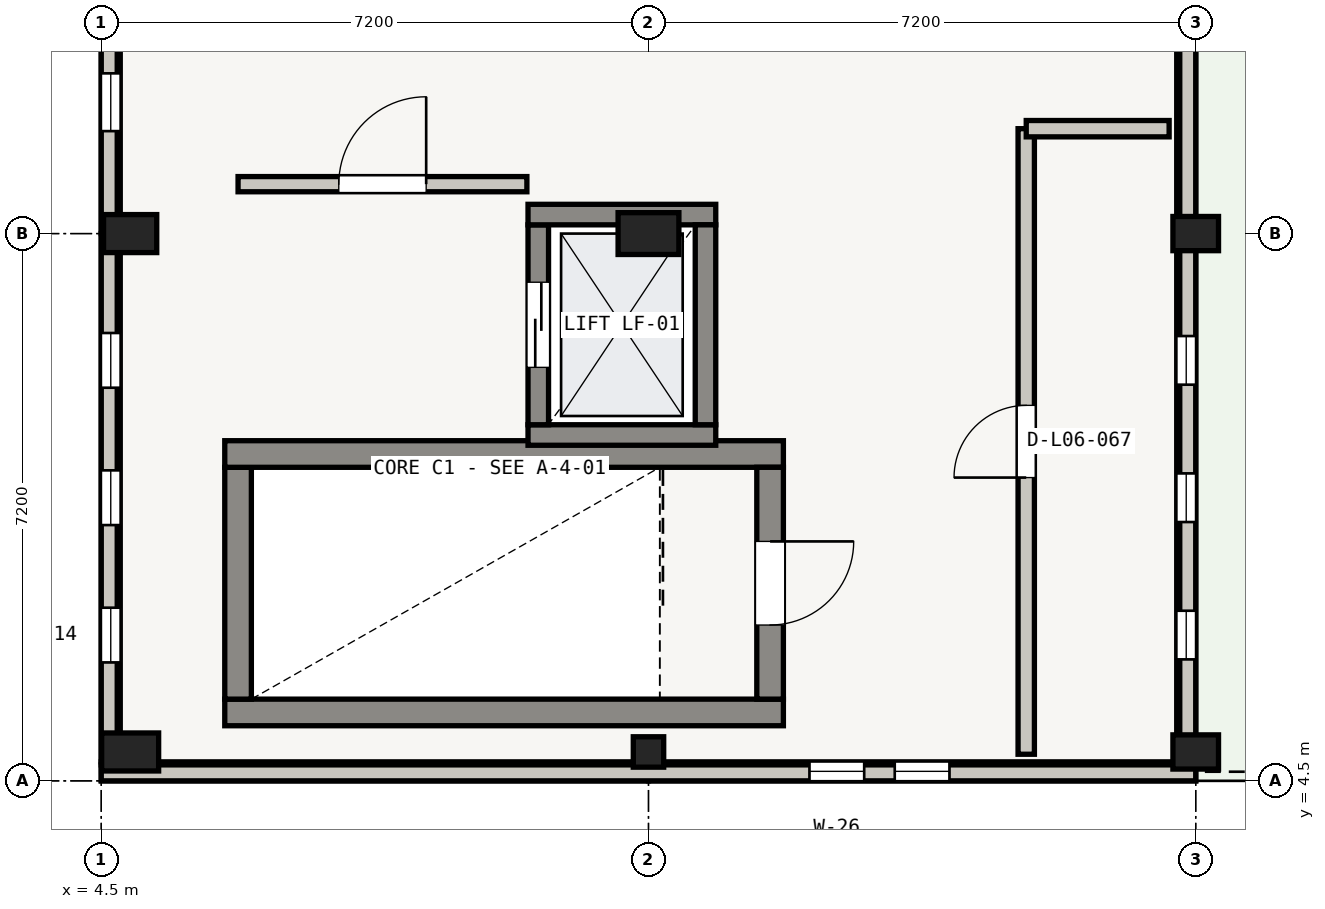
"""IFC4 building model, lengths in metres.
Left out: names, types, materials, properties, quantities, classifications, styles, units other than length and angle.
Written with IfcOpenShell. Run it as: python <this file> out.ifc"""

import sys

from ifc_helpers import new_model, si_unit, direction, frame, frame_2d, origin, origin_2d, place, context, subcontext, project, spatial, rectangle, extrude, element, fill, save


model = new_model("IFC4")
c1 = context("Model", 3, precision=1e-05, world=origin(), true_north=direction((0.0, 1.0)))
c2 = subcontext(c1, "Body", "Model", "MODEL_VIEW")
j1 = project(units=[si_unit("LENGTHUNIT", "METRE"), si_unit("PLANEANGLEUNIT", "RADIAN")], contexts=[c1])
p1 = place(None, origin())
s1 = spatial("IfcSite", under=j1, at=p1, CompositionType="ELEMENT")
p2 = place(p1, origin())
s2 = spatial("IfcBuilding", under=s1, at=p2, CompositionType="ELEMENT")
p3 = place(p2, frame((0.0, 0.0, 25.05)))
s3 = spatial("IfcBuildingStorey", under=s2, at=p3, CompositionType="ELEMENT", Elevation=25.05)
p4 = place(p3, frame((4.88, 4.88, 0.0), z_axis=(0.0, 0.0, 1.0), x_axis=(1.0, 0.0, 0.0)))
e1 = element("IfcColumn", 1, at=p4, inside=s3, PredefinedType="COLUMN", context=c2, shape_type="SweptSolid", body=[
    extrude(rectangle(XDim=0.75, YDim=0.5, at=origin_2d()), origin(), (0.0, 0.0, 1.0), 3.66),
])
p5 = place(p3, frame((4.88, 11.7, 0.0), z_axis=(0.0, 0.0, 1.0), x_axis=(1.0, 0.0, 0.0)))
e2 = element("IfcColumn", 2, at=p5, inside=s3, PredefinedType="COLUMN", context=c2, shape_type="SweptSolid", body=[
    extrude(rectangle(XDim=0.7, YDim=0.5, at=origin_2d()), origin(), (0.0, 0.0, 1.0), 3.66),
])
p6 = place(p3, frame((11.7, 4.88, 0.0), z_axis=(0.0, 0.0, 1.0), x_axis=(1.0, 0.0, 0.0)))
e3 = element("IfcColumn", 3, at=p6, inside=s3, PredefinedType="COLUMN", context=c2, shape_type="SweptSolid", body=[
    extrude(rectangle(XDim=0.4, YDim=0.4, at=origin_2d()), origin(), (0.0, 0.0, 1.0), 3.66),
])
p7 = place(p3, frame((11.7, 11.7, 0.0), z_axis=(0.0, 0.0, 1.0), x_axis=(1.0, 0.0, 0.0)))
e4 = element("IfcColumn", 4, at=p7, inside=s3, PredefinedType="COLUMN", context=c2, shape_type="SweptSolid", body=[
    extrude(rectangle(XDim=0.8, YDim=0.55, at=origin_2d()), origin(), (0.0, 0.0, 1.0), 3.66),
])
for number, where, z_axis, x_axis in (
    (5, (18.9, 4.88, 0.0), (0.0, 0.0, 1.0), (1.0, 0.0, 0.0)),
    (6, (18.9, 11.7, 0.0), (0.0, 0.0, 1.0), (1.0, 0.0, 0.0)),
):
    element("IfcColumn", number, at=place(p3, frame(where, z_axis=z_axis, x_axis=x_axis)), inside=s3, PredefinedType="COLUMN", context=c2, shape_type="SweptSolid", body=[
        extrude(rectangle(XDim=0.6, YDim=0.45, at=origin_2d()), origin(), (0.0, 0.0, 1.0), 3.66),
    ])
p8 = place(p3, frame((18.775, 18.9, 0.0), z_axis=(0.0, 0.0, 1.0), x_axis=(0.0, -1.0, 0.0)))
e7 = element("IfcWall", 7, at=p8, inside=s3, PredefinedType="STANDARD", context=c2, shape_type="SweptSolid", body=[
    extrude(rectangle(XDim=7.2, YDim=0.25, at=frame_2d((3.6, 0.0))), origin(), (0.0, 0.0, 1.0), 2.695),
])
p9 = place(p8, frame((3.025, 0.0, 0.19)))
e8 = element("IfcOpeningElement", 8, at=p9, cuts=e7, PredefinedType="OPENING", context=c2, shape_type="SweptSolid", body=[
    extrude(rectangle(XDim=1.15, YDim=2.02, at=frame_2d((0.575, 1.01))), frame((0.0, 0.125, 0.0), z_axis=(0.0, -1.0, 0.0), x_axis=(1.0, 0.0, 0.0)), (0.0, 0.0, 1.0), 0.25),
])
p10 = place(p3, frame((18.775, 11.7, 0.0), z_axis=(0.0, 0.0, 1.0), x_axis=(0.0, -1.0, 0.0)))
e9 = element("IfcWall", 9, at=p10, inside=s3, PredefinedType="STANDARD", context=c2, shape_type="SweptSolid", body=[
    extrude(rectangle(XDim=6.95, YDim=0.25, at=frame_2d((3.475, 0.0))), origin(), (0.0, 0.0, 1.0), 2.695),
])
p11 = place(p10, frame((1.348, 0.0, 0.6)))
e10 = element("IfcOpeningElement", 10, at=p11, cuts=e9, PredefinedType="OPENING", context=c2, shape_type="SweptSolid", body=[
    extrude(rectangle(XDim=0.64, YDim=1.85, at=frame_2d((0.32, 0.925))), frame((0.0, 0.125, 0.0), z_axis=(0.0, -1.0, 0.0), x_axis=(1.0, 0.0, 0.0)), (0.0, 0.0, 1.0), 0.25),
])
p12 = place(p10, frame((3.155, 0.0, 0.6)))
e11 = element("IfcOpeningElement", 11, at=p12, cuts=e9, PredefinedType="OPENING", context=c2, shape_type="SweptSolid", body=[
    extrude(rectangle(XDim=0.64, YDim=1.85, at=frame_2d((0.32, 0.925))), frame((0.0, 0.125, 0.0), z_axis=(0.0, -1.0, 0.0), x_axis=(1.0, 0.0, 0.0)), (0.0, 0.0, 1.0), 0.25),
])
p13 = place(p10, frame((4.962, 0.0, 0.6)))
e12 = element("IfcOpeningElement", 12, at=p13, cuts=e9, PredefinedType="OPENING", context=c2, shape_type="SweptSolid", body=[
    extrude(rectangle(XDim=0.64, YDim=1.85, at=frame_2d((0.32, 0.925))), frame((0.0, 0.125, 0.0), z_axis=(0.0, -1.0, 0.0), x_axis=(1.0, 0.0, 0.0)), (0.0, 0.0, 1.0), 0.25),
])
p14 = place(p3, frame((18.9, 4.625, 0.0), z_axis=(0.0, 0.0, 1.0), x_axis=(-1.0, 0.0, 0.0)))
e13 = element("IfcWall", 13, at=p14, inside=s3, PredefinedType="STANDARD", context=c2, shape_type="SweptSolid", body=[
    extrude(rectangle(XDim=7.2, YDim=0.25, at=frame_2d((3.6, 0.0))), origin(), (0.0, 0.0, 1.0), 2.695),
])
p15 = place(p14, frame((3.24, 0.0, 0.6)))
e14 = element("IfcOpeningElement", 14, at=p15, cuts=e13, PredefinedType="OPENING", context=c2, shape_type="SweptSolid", body=[
    extrude(rectangle(XDim=0.72, YDim=1.85, at=frame_2d((0.36, 0.925))), frame((0.0, 0.125, 0.0), z_axis=(0.0, -1.0, 0.0), x_axis=(1.0, 0.0, 0.0)), (0.0, 0.0, 1.0), 0.25),
])
p16 = place(p14, frame((4.362, 0.0, 0.6)))
e15 = element("IfcOpeningElement", 15, at=p16, cuts=e13, PredefinedType="OPENING", context=c2, shape_type="SweptSolid", body=[
    extrude(rectangle(XDim=0.72, YDim=1.85, at=frame_2d((0.36, 0.925))), frame((0.0, 0.125, 0.0), z_axis=(0.0, -1.0, 0.0), x_axis=(1.0, 0.0, 0.0)), (0.0, 0.0, 1.0), 0.25),
])
p17 = place(p3, frame((11.7, 4.625, 0.0), z_axis=(0.0, 0.0, 1.0), x_axis=(-1.0, 0.0, 0.0)))
e16 = element("IfcWall", 16, at=p17, inside=s3, PredefinedType="STANDARD", context=c2, shape_type="SweptSolid", body=[
    extrude(rectangle(XDim=7.2, YDim=0.25, at=frame_2d((3.6, 0.0))), origin(), (0.0, 0.0, 1.0), 3.095),
])
p18 = place(p3, frame((4.625, 4.75, 0.0), z_axis=(0.0, 0.0, 1.0), x_axis=(0.0, 1.0, 0.0)))
e17 = element("IfcWall", 17, at=p18, inside=s3, PredefinedType="STANDARD", context=c2, shape_type="SweptSolid", body=[
    extrude(rectangle(XDim=6.95, YDim=0.25, at=frame_2d((3.475, 0.0))), origin(), (0.0, 0.0, 1.0), 3.065),
])
p19 = place(p18, frame((1.308, 0.0, 0.55)))
e18 = element("IfcOpeningElement", 18, at=p19, cuts=e17, PredefinedType="OPENING", context=c2, shape_type="SweptSolid", body=[
    extrude(rectangle(XDim=0.72, YDim=2.22, at=frame_2d((0.36, 1.11))), frame((0.0, 0.125, 0.0), z_axis=(0.0, -1.0, 0.0), x_axis=(1.0, 0.0, 0.0)), (0.0, 0.0, 1.0), 0.25),
])
p20 = place(p18, frame((3.115, 0.0, 0.55)))
e19 = element("IfcOpeningElement", 19, at=p20, cuts=e17, PredefinedType="OPENING", context=c2, shape_type="SweptSolid", body=[
    extrude(rectangle(XDim=0.72, YDim=2.22, at=frame_2d((0.36, 1.11))), frame((0.0, 0.125, 0.0), z_axis=(0.0, -1.0, 0.0), x_axis=(1.0, 0.0, 0.0)), (0.0, 0.0, 1.0), 0.25),
])
p21 = place(p18, frame((4.922, 0.0, 0.55)))
e20 = element("IfcOpeningElement", 20, at=p21, cuts=e17, PredefinedType="OPENING", context=c2, shape_type="SweptSolid", body=[
    extrude(rectangle(XDim=0.72, YDim=2.22, at=frame_2d((0.36, 1.11))), frame((0.0, 0.125, 0.0), z_axis=(0.0, -1.0, 0.0), x_axis=(1.0, 0.0, 0.0)), (0.0, 0.0, 1.0), 0.25),
])
p22 = place(p3, frame((4.625, 11.7, 0.0), z_axis=(0.0, 0.0, 1.0), x_axis=(0.0, 1.0, 0.0)))
e21 = element("IfcWall", 21, at=p22, inside=s3, PredefinedType="STANDARD", context=c2, shape_type="SweptSolid", body=[
    extrude(rectangle(XDim=7.2, YDim=0.25, at=frame_2d((3.6, 0.0))), origin(), (0.0, 0.0, 1.0), 3.065),
])
p23 = place(p22, frame((1.348, 0.0, 0.55)))
e22 = element("IfcOpeningElement", 22, at=p23, cuts=e21, PredefinedType="OPENING", context=c2, shape_type="SweptSolid", body=[
    extrude(rectangle(XDim=0.76, YDim=2.16, at=frame_2d((0.38, 1.08))), frame((0.0, 0.125, 0.0), z_axis=(0.0, -1.0, 0.0), x_axis=(1.0, 0.0, 0.0)), (0.0, 0.0, 1.0), 0.25),
])
p24 = place(p22, frame((2.47, 0.0, 0.55)))
e23 = element("IfcOpeningElement", 23, at=p24, cuts=e21, PredefinedType="OPENING", context=c2, shape_type="SweptSolid", body=[
    extrude(rectangle(XDim=0.76, YDim=2.16, at=frame_2d((0.38, 1.08))), frame((0.0, 0.125, 0.0), z_axis=(0.0, -1.0, 0.0), x_axis=(1.0, 0.0, 0.0)), (0.0, 0.0, 1.0), 0.25),
])
p25 = place(p22, frame((5.092, 0.0, 0.55)))
e24 = element("IfcOpeningElement", 24, at=p25, cuts=e21, PredefinedType="OPENING", context=c2, shape_type="SweptSolid", body=[
    extrude(rectangle(XDim=0.76, YDim=2.16, at=frame_2d((0.38, 1.08))), frame((0.0, 0.125, 0.0), z_axis=(0.0, -1.0, 0.0), x_axis=(1.0, 0.0, 0.0)), (0.0, 0.0, 1.0), 0.25),
])
p26 = place(p3, frame((18.795, 25.89, 3.9), z_axis=(0.0, 0.0, 1.0), x_axis=(0.0, -1.0, 0.0)))
e25 = element("IfcWall", 25, at=p26, inside=s3, PredefinedType="PARAPET", context=c2, shape_type="SweptSolid", body=[
    extrude(rectangle(XDim=21.18, YDim=0.21, at=frame_2d((10.59, 0.0))), origin(), (0.0, 0.0, 1.0), 1.1),
])
p27 = place(p3, frame((18.9, 4.605, 3.9), z_axis=(0.0, 0.0, 1.0), x_axis=(-1.0, 0.0, 0.0)))
e26 = element("IfcWall", 26, at=p27, inside=s3, PredefinedType="PARAPET", context=c2, shape_type="SweptSolid", body=[
    extrude(rectangle(XDim=14.4, YDim=0.21, at=frame_2d((7.2, 0.0))), origin(), (0.0, 0.0, 1.0), 1.1),
])
p28 = place(p3, frame((4.605, 4.71, 3.9), z_axis=(0.0, 0.0, 1.0), x_axis=(0.0, 1.0, 0.0)))
e27 = element("IfcWall", 27, at=p28, inside=s3, PredefinedType="PARAPET", context=c2, shape_type="SweptSolid", body=[
    extrude(rectangle(XDim=21.18, YDim=0.21, at=frame_2d((10.59, 0.0))), origin(), (0.0, 0.0, 1.0), 1.1),
])
p29 = place(p3, frame((13.475, 5.4, 0.0), z_axis=(0.0, 0.0, 1.0), x_axis=(-1.0, 0.0, 0.0)))
e28 = element("IfcWall", 28, at=p29, inside=s3, PredefinedType="SHEAR", context=c2, shape_type="SweptSolid", body=[
    extrude(rectangle(XDim=7.35, YDim=0.35, at=frame_2d((3.675, 0.0))), origin(), (0.0, 0.0, 1.0), 3.62),
])
p30 = place(p3, frame((6.3, 5.575, 0.0), z_axis=(0.0, 0.0, 1.0), x_axis=(0.0, 1.0, 0.0)))
e29 = element("IfcWall", 29, at=p30, inside=s3, PredefinedType="SHEAR", context=c2, shape_type="SweptSolid", body=[
    extrude(rectangle(XDim=3.05, YDim=0.35, at=frame_2d((1.525, 0.0))), origin(), (0.0, 0.0, 1.0), 3.62),
])
p31 = place(p3, frame((6.125, 8.8, 0.0), z_axis=(0.0, 0.0, 1.0), x_axis=(1.0, 0.0, 0.0)))
e30 = element("IfcWall", 30, at=p31, inside=s3, PredefinedType="SHEAR", context=c2, shape_type="SweptSolid", body=[
    extrude(rectangle(XDim=7.35, YDim=0.35, at=frame_2d((3.675, 0.0))), origin(), (0.0, 0.0, 1.0), 3.62),
])
p32 = place(p3, frame((13.3, 8.625, 0.0), z_axis=(0.0, 0.0, 1.0), x_axis=(0.0, -1.0, 0.0)))
e31 = element("IfcWall", 31, at=p32, inside=s3, PredefinedType="SHEAR", context=c2, shape_type="SweptSolid", body=[
    extrude(rectangle(XDim=3.05, YDim=0.35, at=frame_2d((1.525, 0.0))), origin(), (0.0, 0.0, 1.0), 3.62),
])
p33 = place(p32, frame((0.975, 0.0, 0.0)))
e32 = element("IfcOpeningElement", 32, at=p33, cuts=e31, PredefinedType="OPENING", context=c2, shape_type="SweptSolid", body=[
    extrude(rectangle(XDim=1.1, YDim=2.05, at=frame_2d((0.55, 1.025))), frame((0.0, 0.175, 0.0), z_axis=(0.0, -1.0, 0.0), x_axis=(1.0, 0.0, 0.0)), (0.0, 0.0, 1.0), 0.35),
])
p34 = place(p3, frame((12.585, 9.05, 0.0), z_axis=(0.0, 0.0, 1.0), x_axis=(-1.0, 0.0, 0.0)))
e33 = element("IfcWall", 33, at=p34, inside=s3, PredefinedType="SHEAR", context=c2, shape_type="SweptSolid", body=[
    extrude(rectangle(XDim=2.47, YDim=0.27, at=frame_2d((1.235, 0.0))), origin(), (0.0, 0.0, 1.0), 3.62),
])
p35 = place(p3, frame((10.25, 9.185, 0.0), z_axis=(0.0, 0.0, 1.0), x_axis=(0.0, 1.0, 0.0)))
e34 = element("IfcWall", 34, at=p35, inside=s3, PredefinedType="SHEAR", context=c2, shape_type="SweptSolid", body=[
    extrude(rectangle(XDim=2.63, YDim=0.27, at=frame_2d((1.315, 0.0))), origin(), (0.0, 0.0, 1.0), 3.62),
])
p36 = place(p35, frame((0.755, 0.0, 0.0)))
e35 = element("IfcOpeningElement", 35, at=p36, cuts=e34, PredefinedType="OPENING", context=c2, shape_type="SweptSolid", body=[
    extrude(rectangle(XDim=1.12, YDim=2.1, at=frame_2d((0.56, 1.05))), frame((0.0, 0.135, 0.0), z_axis=(0.0, -1.0, 0.0), x_axis=(1.0, 0.0, 0.0)), (0.0, 0.0, 1.0), 0.27),
])
p37 = place(p3, frame((10.115, 11.95, 0.0), z_axis=(0.0, 0.0, 1.0), x_axis=(1.0, 0.0, 0.0)))
e36 = element("IfcWall", 36, at=p37, inside=s3, PredefinedType="SHEAR", context=c2, shape_type="SweptSolid", body=[
    extrude(rectangle(XDim=2.47, YDim=0.27, at=frame_2d((1.235, 0.0))), origin(), (0.0, 0.0, 1.0), 3.62),
])
p38 = place(p3, frame((12.45, 11.815, 0.0), z_axis=(0.0, 0.0, 1.0), x_axis=(0.0, -1.0, 0.0)))
e37 = element("IfcWall", 37, at=p38, inside=s3, PredefinedType="SHEAR", context=c2, shape_type="SweptSolid", body=[
    extrude(rectangle(XDim=2.63, YDim=0.27, at=frame_2d((1.315, 0.0))), origin(), (0.0, 0.0, 1.0), 3.62),
])
p39 = place(p3, frame((6.3, 12.35, 0.0), z_axis=(0.0, 0.0, 1.0), x_axis=(1.0, 0.0, 0.0)))
e38 = element("IfcWall", 38, at=p39, inside=s3, PredefinedType="SOLIDWALL", context=c2, shape_type="SweptSolid", body=[
    extrude(rectangle(XDim=3.8, YDim=0.2, at=frame_2d((1.9, 0.0))), origin(), (0.0, 0.0, 1.0), 2.64),
])
p40 = place(p39, frame((1.325, 0.0, 0.0)))
e39 = element("IfcOpeningElement", 39, at=p40, cuts=e38, PredefinedType="OPENING", context=c2, shape_type="SweptSolid", body=[
    extrude(rectangle(XDim=1.15, YDim=2.05, at=frame_2d((0.575, 1.025))), frame((0.0, 0.1, 0.0), z_axis=(0.0, -1.0, 0.0), x_axis=(1.0, 0.0, 0.0)), (0.0, 0.0, 1.0), 0.2),
])
p41 = place(p3, frame((16.67, 4.85, 0.0), z_axis=(0.0, 0.0, 1.0), x_axis=(0.0, 1.0, 0.0)))
e40 = element("IfcWall", 40, at=p41, inside=s3, PredefinedType="PLUMBINGWALL", context=c2, shape_type="SweptSolid", body=[
    extrude(rectangle(XDim=8.23, YDim=0.215, at=frame_2d((4.115, 0.0))), origin(), (0.0, 0.0, 1.0), 2.64),
])
p42 = place(p41, frame((3.64, 0.0, 0.0)))
e41 = element("IfcOpeningElement", 41, at=p42, cuts=e40, PredefinedType="OPENING", context=c2, shape_type="SweptSolid", body=[
    extrude(rectangle(XDim=0.95, YDim=2.05, at=frame_2d((0.475, 1.025))), frame((0.0, 0.107, 0.0), z_axis=(0.0, -1.0, 0.0), x_axis=(1.0, 0.0, 0.0)), (0.0, 0.0, 1.0), 0.215),
])
p43 = place(p3, frame((16.67, 13.08, 0.0), z_axis=(0.0, 0.0, 1.0), x_axis=(1.0, 0.0, 0.0)))
e42 = element("IfcWall", 42, at=p43, inside=s3, PredefinedType="PLUMBINGWALL", context=c2, shape_type="SweptSolid", body=[
    extrude(rectangle(XDim=1.88, YDim=0.215, at=frame_2d((0.94, 0.0))), origin(), (0.0, 0.0, 1.0), 2.64),
])
p44 = place(p11, origin())
e43 = element("IfcWindow", 43, at=p44, inside=s3, PartitioningType="SINGLE_PANEL", PredefinedType="WINDOW", context=c2, shape_type="SweptSolid", body=[
    extrude(rectangle(XDim=0.64, YDim=1.85, at=frame_2d((0.32, 0.925))), frame((0.0, 0.03, 0.0), z_axis=(0.0, -1.0, 0.0), x_axis=(1.0, 0.0, 0.0)), (0.0, 0.0, 1.0), 0.06),
])
fill(e10, e43)
p45 = place(p12, origin())
e44 = element("IfcWindow", 44, at=p45, inside=s3, PartitioningType="SINGLE_PANEL", PredefinedType="WINDOW", context=c2, shape_type="SweptSolid", body=[
    extrude(rectangle(XDim=0.64, YDim=1.85, at=frame_2d((0.32, 0.925))), frame((0.0, 0.03, 0.0), z_axis=(0.0, -1.0, 0.0), x_axis=(1.0, 0.0, 0.0)), (0.0, 0.0, 1.0), 0.06),
])
fill(e11, e44)
p46 = place(p13, origin())
e45 = element("IfcWindow", 45, at=p46, inside=s3, PartitioningType="SINGLE_PANEL", PredefinedType="WINDOW", context=c2, shape_type="SweptSolid", body=[
    extrude(rectangle(XDim=0.64, YDim=1.85, at=frame_2d((0.32, 0.925))), frame((0.0, 0.03, 0.0), z_axis=(0.0, -1.0, 0.0), x_axis=(1.0, 0.0, 0.0)), (0.0, 0.0, 1.0), 0.06),
])
fill(e12, e45)
p47 = place(p15, origin())
e46 = element("IfcWindow", 46, at=p47, inside=s3, PartitioningType="SINGLE_PANEL", PredefinedType="WINDOW", context=c2, shape_type="SweptSolid", body=[
    extrude(rectangle(XDim=0.72, YDim=1.85, at=frame_2d((0.36, 0.925))), frame((0.0, 0.03, 0.0), z_axis=(0.0, -1.0, 0.0), x_axis=(1.0, 0.0, 0.0)), (0.0, 0.0, 1.0), 0.06),
])
fill(e14, e46)
p48 = place(p16, origin())
e47 = element("IfcWindow", 47, at=p48, inside=s3, PartitioningType="SINGLE_PANEL", PredefinedType="WINDOW", context=c2, shape_type="SweptSolid", body=[
    extrude(rectangle(XDim=0.72, YDim=1.85, at=frame_2d((0.36, 0.925))), frame((0.0, 0.03, 0.0), z_axis=(0.0, -1.0, 0.0), x_axis=(1.0, 0.0, 0.0)), (0.0, 0.0, 1.0), 0.06),
])
fill(e15, e47)
p49 = place(p19, origin())
e48 = element("IfcWindow", 48, at=p49, inside=s3, PartitioningType="SINGLE_PANEL", PredefinedType="WINDOW", context=c2, shape_type="SweptSolid", body=[
    extrude(rectangle(XDim=0.72, YDim=2.22, at=frame_2d((0.36, 1.11))), frame((0.0, 0.03, 0.0), z_axis=(0.0, -1.0, 0.0), x_axis=(1.0, 0.0, 0.0)), (0.0, 0.0, 1.0), 0.06),
])
fill(e18, e48)
p50 = place(p20, origin())
e49 = element("IfcWindow", 49, at=p50, inside=s3, PartitioningType="SINGLE_PANEL", PredefinedType="WINDOW", context=c2, shape_type="SweptSolid", body=[
    extrude(rectangle(XDim=0.72, YDim=2.22, at=frame_2d((0.36, 1.11))), frame((0.0, 0.03, 0.0), z_axis=(0.0, -1.0, 0.0), x_axis=(1.0, 0.0, 0.0)), (0.0, 0.0, 1.0), 0.06),
])
fill(e19, e49)
p51 = place(p21, origin())
e50 = element("IfcWindow", 50, at=p51, inside=s3, PartitioningType="SINGLE_PANEL", PredefinedType="WINDOW", context=c2, shape_type="SweptSolid", body=[
    extrude(rectangle(XDim=0.72, YDim=2.22, at=frame_2d((0.36, 1.11))), frame((0.0, 0.03, 0.0), z_axis=(0.0, -1.0, 0.0), x_axis=(1.0, 0.0, 0.0)), (0.0, 0.0, 1.0), 0.06),
])
fill(e20, e50)
p52 = place(p23, origin())
e51 = element("IfcWindow", 51, at=p52, inside=s3, PartitioningType="SINGLE_PANEL", PredefinedType="WINDOW", context=c2, shape_type="SweptSolid", body=[
    extrude(rectangle(XDim=0.76, YDim=2.16, at=frame_2d((0.38, 1.08))), frame((0.0, 0.03, 0.0), z_axis=(0.0, -1.0, 0.0), x_axis=(1.0, 0.0, 0.0)), (0.0, 0.0, 1.0), 0.06),
])
fill(e22, e51)
p53 = place(p33, origin())
e52 = element("IfcDoor", 52, at=p53, inside=s3, OperationType="SINGLE_SWING_LEFT", PredefinedType="DOOR", context=c2, shape_type="SweptSolid", body=[
    extrude(rectangle(XDim=1.1, YDim=2.05, at=frame_2d((0.55, 1.025))), frame((0.0, 0.025, 0.0), z_axis=(0.0, -1.0, 0.0), x_axis=(1.0, 0.0, 0.0)), (0.0, 0.0, 1.0), 0.05),
])
fill(e32, e52)
p54 = place(p36, origin())
e53 = element("IfcDoor", 53, at=p54, inside=s3, OperationType="DOUBLE_DOOR_SLIDING", PredefinedType="DOOR", context=c2, shape_type="SweptSolid", body=[
    extrude(rectangle(XDim=1.12, YDim=2.1, at=frame_2d((0.56, 1.05))), frame((0.0, 0.025, 0.0), z_axis=(0.0, -1.0, 0.0), x_axis=(1.0, 0.0, 0.0)), (0.0, 0.0, 1.0), 0.05),
])
fill(e35, e53)
p55 = place(p40, origin())
e54 = element("IfcDoor", 54, at=p55, inside=s3, OperationType="SINGLE_SWING_RIGHT", PredefinedType="DOOR", context=c2, shape_type="SweptSolid", body=[
    extrude(rectangle(XDim=1.15, YDim=2.05, at=frame_2d((0.575, 1.025))), frame((0.0, 0.025, 0.0), z_axis=(0.0, -1.0, 0.0), x_axis=(1.0, 0.0, 0.0)), (0.0, 0.0, 1.0), 0.05),
])
fill(e39, e54)
p56 = place(p42, origin())
e55 = element("IfcDoor", 55, at=p56, inside=s3, OperationType="SINGLE_SWING_LEFT", PredefinedType="DOOR", context=c2, shape_type="SweptSolid", body=[
    extrude(rectangle(XDim=0.95, YDim=2.05, at=frame_2d((0.475, 1.025))), frame((0.0, 0.025, 0.0), z_axis=(0.0, -1.0, 0.0), x_axis=(1.0, 0.0, 0.0)), (0.0, 0.0, 1.0), 0.05),
])
fill(e41, e55)
save(model, sys.argv[1])
